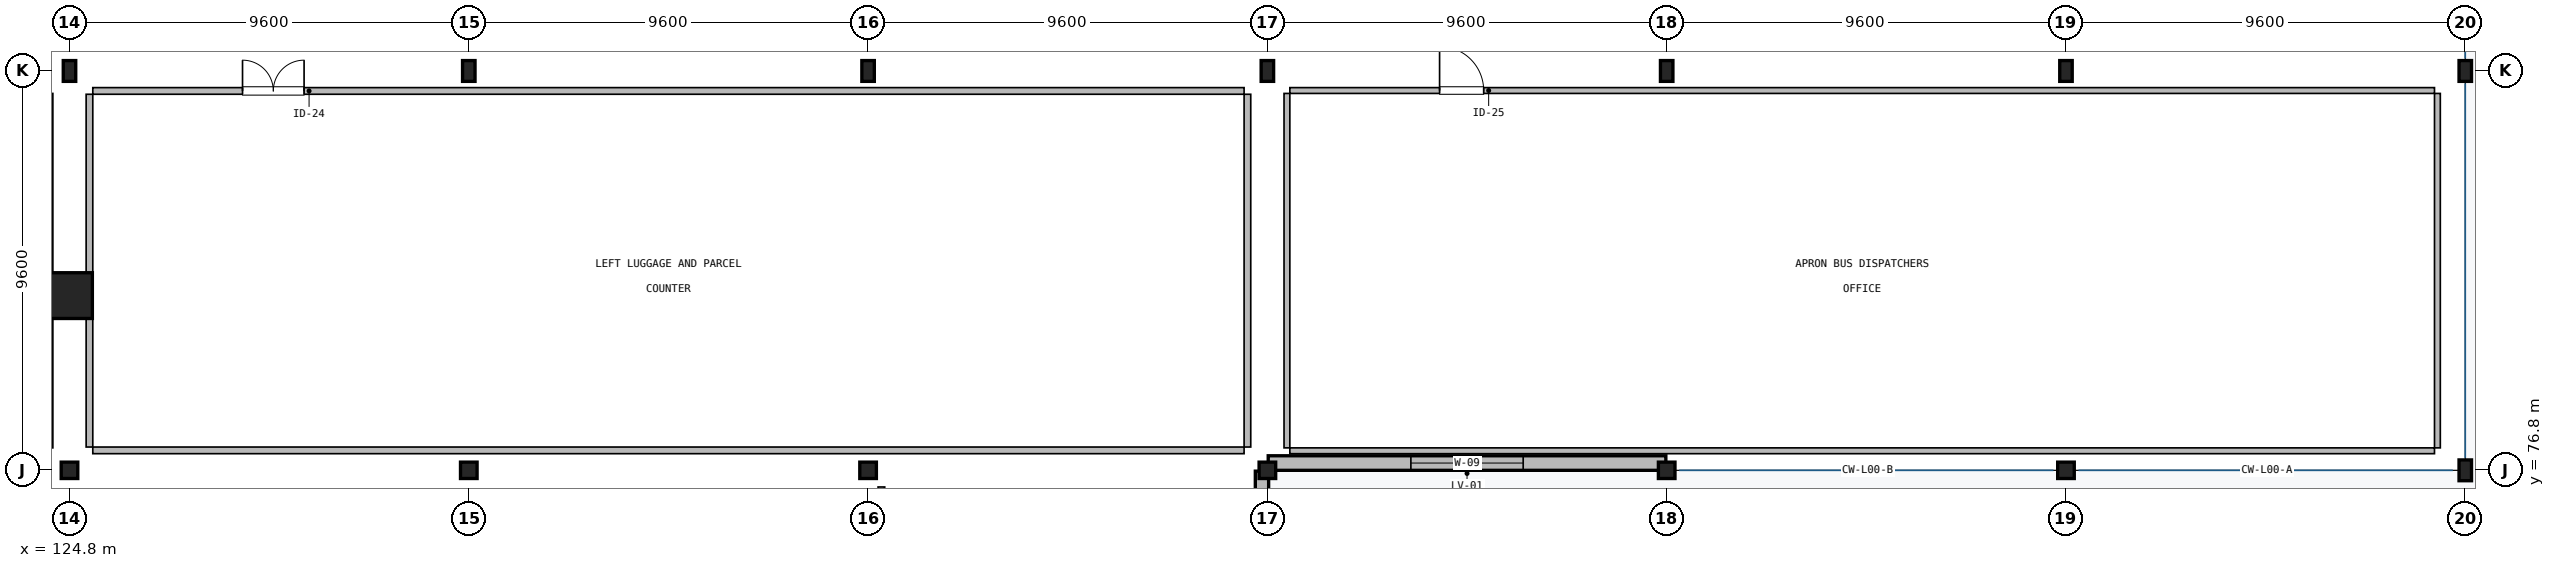
"""IFC4 building model, lengths in metres.
Left out: names, types, materials, properties, quantities, classifications, styles, units other than length and angle.
Written with IfcOpenShell. Run it as: python <this file> out.ifc"""

import sys

from ifc_helpers import new_model, si_unit, direction, frame, frame_2d, origin, origin_2d, place, context, subcontext, project, spatial, rectangle, i_section, extrude, element, fill, save


model = new_model("IFC4")
c1 = context("Model", 3, precision=1e-05, world=origin(), true_north=direction((0.0, 1.0)))
c2 = subcontext(c1, "Body", "Model", "MODEL_VIEW")
j1 = project(units=[si_unit("LENGTHUNIT", "METRE"), si_unit("PLANEANGLEUNIT", "RADIAN")], contexts=[c1])
p1 = place(None, origin())
s1 = spatial("IfcSite", under=j1, at=p1, CompositionType="ELEMENT")
p2 = place(p1, origin())
s2 = spatial("IfcBuilding", under=s1, at=p2, CompositionType="ELEMENT")
p3 = place(p2, origin())
s3 = spatial("IfcBuildingStorey", under=s2, at=p3, CompositionType="ELEMENT", Elevation=0.0)
p4 = place(p3, frame((124.8, 81.0, -0.02), z_axis=(0.0, 0.0, 1.0), x_axis=(1.0, 0.0, 0.0)))
e1 = element("IfcColumn", 1, at=p4, inside=s3, PredefinedType="COLUMN", context=c2, shape_type="SweptSolid", body=[
    extrude(rectangle(XDim=1.1, YDim=1.1, at=origin_2d()), origin(), (0.0, 0.0, 1.0), 1.84),
])
p5 = place(p3, frame((124.8, 76.8, 0.0), z_axis=(0.0, 0.0, 1.0), x_axis=(1.0, 0.0, 0.0)))
e2 = element("IfcColumn", 2, at=p5, inside=s3, PredefinedType="COLUMN", context=c2, shape_type="SweptSolid", body=[
    extrude(i_section(OverallWidth=0.399, OverallDepth=0.394, WebThickness=0.023, FlangeThickness=0.037, FilletRadius=0.015, at=origin_2d()), origin(), (0.0, 0.0, 1.0), 5.75),
])
p6 = place(p3, frame((124.8, 86.4, -0.36), z_axis=(0.0, 0.0, 1.0), x_axis=(1.0, 0.0, 0.0)))
e3 = element("IfcColumn", 3, at=p6, inside=s3, PredefinedType="COLUMN", context=c2, shape_type="SweptSolid", body=[
    extrude(i_section(OverallWidth=0.3, OverallDepth=0.5, WebThickness=0.014, FlangeThickness=0.028, FilletRadius=0.027, at=origin_2d()), origin(), (0.0, 0.0, 1.0), 6.11),
])
p7 = place(p3, frame((134.4, 76.8, 0.0), z_axis=(0.0, 0.0, 1.0), x_axis=(1.0, 0.0, 0.0)))
e4 = element("IfcColumn", 4, at=p7, inside=s3, PredefinedType="COLUMN", context=c2, shape_type="SweptSolid", body=[
    extrude(i_section(OverallWidth=0.399, OverallDepth=0.394, WebThickness=0.023, FlangeThickness=0.037, FilletRadius=0.015, at=origin_2d()), origin(), (0.0, 0.0, 1.0), 5.75),
])
p8 = place(p3, frame((134.4, 86.4, -0.36), z_axis=(0.0, 0.0, 1.0), x_axis=(1.0, 0.0, 0.0)))
e5 = element("IfcColumn", 5, at=p8, inside=s3, PredefinedType="COLUMN", context=c2, shape_type="SweptSolid", body=[
    extrude(i_section(OverallWidth=0.3, OverallDepth=0.5, WebThickness=0.014, FlangeThickness=0.028, FilletRadius=0.027, at=origin_2d()), origin(), (0.0, 0.0, 1.0), 6.11),
])
p9 = place(p3, frame((144.0, 76.8, 0.0), z_axis=(0.0, 0.0, 1.0), x_axis=(1.0, 0.0, 0.0)))
e6 = element("IfcColumn", 6, at=p9, inside=s3, PredefinedType="COLUMN", context=c2, shape_type="SweptSolid", body=[
    extrude(i_section(OverallWidth=0.399, OverallDepth=0.394, WebThickness=0.023, FlangeThickness=0.037, FilletRadius=0.015, at=origin_2d()), origin(), (0.0, 0.0, 1.0), 5.75),
])
p10 = place(p3, frame((144.0, 86.4, -0.36), z_axis=(0.0, 0.0, 1.0), x_axis=(1.0, 0.0, 0.0)))
e7 = element("IfcColumn", 7, at=p10, inside=s3, PredefinedType="COLUMN", context=c2, shape_type="SweptSolid", body=[
    extrude(i_section(OverallWidth=0.3, OverallDepth=0.5, WebThickness=0.014, FlangeThickness=0.028, FilletRadius=0.027, at=origin_2d()), origin(), (0.0, 0.0, 1.0), 6.11),
])
p11 = place(p3, frame((153.6, 76.8, 0.0), z_axis=(0.0, 0.0, 1.0), x_axis=(1.0, 0.0, 0.0)))
e8 = element("IfcColumn", 8, at=p11, inside=s3, PredefinedType="COLUMN", context=c2, shape_type="SweptSolid", body=[
    extrude(i_section(OverallWidth=0.399, OverallDepth=0.394, WebThickness=0.023, FlangeThickness=0.037, FilletRadius=0.015, at=origin_2d()), origin(), (0.0, 0.0, 1.0), 5.75),
])
p12 = place(p3, frame((153.6, 86.4, -0.36), z_axis=(0.0, 0.0, 1.0), x_axis=(1.0, 0.0, 0.0)))
e9 = element("IfcColumn", 9, at=p12, inside=s3, PredefinedType="COLUMN", context=c2, shape_type="SweptSolid", body=[
    extrude(i_section(OverallWidth=0.3, OverallDepth=0.5, WebThickness=0.014, FlangeThickness=0.028, FilletRadius=0.027, at=origin_2d()), origin(), (0.0, 0.0, 1.0), 6.11),
])
p13 = place(p3, frame((163.2, 76.8, -0.36), z_axis=(0.0, 0.0, 1.0), x_axis=(1.0, 0.0, 0.0)))
e10 = element("IfcColumn", 10, at=p13, inside=s3, PredefinedType="COLUMN", context=c2, shape_type="SweptSolid", body=[
    extrude(i_section(OverallWidth=0.399, OverallDepth=0.394, WebThickness=0.023, FlangeThickness=0.037, FilletRadius=0.015, at=origin_2d()), origin(), (0.0, 0.0, 1.0), 6.11),
])
p14 = place(p3, frame((163.2, 86.4, -0.36), z_axis=(0.0, 0.0, 1.0), x_axis=(1.0, 0.0, 0.0)))
e11 = element("IfcColumn", 11, at=p14, inside=s3, PredefinedType="COLUMN", context=c2, shape_type="SweptSolid", body=[
    extrude(i_section(OverallWidth=0.3, OverallDepth=0.5, WebThickness=0.014, FlangeThickness=0.028, FilletRadius=0.027, at=origin_2d()), origin(), (0.0, 0.0, 1.0), 6.11),
])
p15 = place(p3, frame((172.8, 76.8, -0.36), z_axis=(0.0, 0.0, 1.0), x_axis=(1.0, 0.0, 0.0)))
e12 = element("IfcColumn", 12, at=p15, inside=s3, PredefinedType="COLUMN", context=c2, shape_type="SweptSolid", body=[
    extrude(i_section(OverallWidth=0.399, OverallDepth=0.394, WebThickness=0.023, FlangeThickness=0.037, FilletRadius=0.015, at=origin_2d()), origin(), (0.0, 0.0, 1.0), 6.11),
])
for number, where, z_axis, x_axis in (
    (13, (172.8, 86.4, -0.36), (0.0, 0.0, 1.0), (1.0, 0.0, 0.0)),
    (14, (182.4, 76.8, -0.36), (0.0, 0.0, 1.0), (1.0, 0.0, 0.0)),
    (15, (182.4, 86.4, -0.36), (0.0, 0.0, 1.0), (1.0, 0.0, 0.0)),
):
    element("IfcColumn", number, at=place(p3, frame(where, z_axis=z_axis, x_axis=x_axis)), inside=s3, PredefinedType="COLUMN", context=c2, shape_type="SweptSolid", body=[
        extrude(i_section(OverallWidth=0.3, OverallDepth=0.5, WebThickness=0.014, FlangeThickness=0.028, FilletRadius=0.027, at=origin_2d()), origin(), (0.0, 0.0, 1.0), 6.11),
    ])
p16 = place(p3, frame((153.47, 76.78, 0.0), z_axis=(0.0, 0.0, 1.0), x_axis=(0.0, -1.0, 0.0)))
e16 = element("IfcWall", 16, at=p16, inside=s3, PredefinedType="SOLIDWALL", context=c2, shape_type="SweptSolid", body=[
    extrude(rectangle(XDim=9.56, YDim=0.32, at=frame_2d((4.78, 0.0))), origin(), (0.0, 0.0, 1.0), 5.217),
])
p17 = place(p16, frame((1.6, 0.0, 0.0)))
e17 = element("IfcOpeningElement", 17, at=p17, cuts=e16, PredefinedType="OPENING", context=c2, shape_type="SweptSolid", body=[
    extrude(rectangle(XDim=1.6, YDim=2.2, at=frame_2d((0.8, 1.1))), frame((0.0, 0.17, 0.0), z_axis=(0.0, -1.0, 0.0), x_axis=(1.0, 0.0, 0.0)), (0.0, 0.0, 1.0), 0.34),
])
p18 = place(p3, frame((163.18, 76.975, 0.0), z_axis=(0.0, 0.0, 1.0), x_axis=(-1.0, 0.0, 0.0)))
e18 = element("IfcWall", 18, at=p18, inside=s3, PredefinedType="SOLIDWALL", context=c2, shape_type="SweptSolid", body=[
    extrude(rectangle(XDim=9.56, YDim=0.35, at=frame_2d((4.78, 0.0))), origin(), (0.0, 0.0, 1.0), 5.4),
])
p19 = place(p18, frame((3.43, 0.0, 0.9)))
e19 = element("IfcOpeningElement", 19, at=p19, cuts=e18, PredefinedType="OPENING", context=c2, shape_type="SweptSolid", body=[
    extrude(rectangle(XDim=2.7, YDim=1.5, at=frame_2d((1.35, 0.75))), frame((0.0, 0.185, 0.0), z_axis=(0.0, -1.0, 0.0), x_axis=(1.0, 0.0, 0.0)), (0.0, 0.0, 1.0), 0.37),
])
p20 = place(p3, frame((144.32, 71.82, 0.0), z_axis=(0.0, 0.0, 1.0), x_axis=(0.0, 1.0, 0.0)))
e20 = element("IfcWall", 20, at=p20, inside=s3, PredefinedType="PARTITIONING", context=c2, shape_type="SweptSolid", body=[
    extrude(rectangle(XDim=4.58, YDim=0.16, at=frame_2d((2.29, 0.0))), origin(), (0.0, 0.0, 1.0), 5.39),
])
p21 = place(p20, frame((1.1, 0.0, 0.0)))
e21 = element("IfcOpeningElement", 21, at=p21, cuts=e20, PredefinedType="OPENING", context=c2, shape_type="SweptSolid", body=[
    extrude(rectangle(XDim=1.1, YDim=2.2, at=frame_2d((0.55, 1.1))), frame((0.0, 0.09, 0.0), z_axis=(0.0, -1.0, 0.0), x_axis=(1.0, 0.0, 0.0)), (0.0, 0.0, 1.0), 0.18),
])
p22 = place(p3, frame((124.33, 85.86, 0.0), z_axis=(0.0, 0.0, 1.0), x_axis=(0.0, -1.0, 0.0)))
e22 = element("IfcWall", 22, at=p22, inside=s3, PredefinedType="PARTITIONING", context=c2, shape_type="SweptSolid", body=[
    extrude(rectangle(XDim=8.52, YDim=0.14, at=frame_2d((4.26, 0.0))), origin(), (0.0, 0.0, 1.0), 5.39),
])
p23 = place(p3, frame((153.04, 77.28, 0.0), z_axis=(0.0, 0.0, 1.0), x_axis=(-1.0, 0.0, 0.0)))
e23 = element("IfcWall", 23, at=p23, inside=s3, PredefinedType="PARTITIONING", context=c2, shape_type="SweptSolid", body=[
    extrude(rectangle(XDim=27.68, YDim=0.16, at=frame_2d((13.84, 0.0))), origin(), (0.0, 0.0, 1.0), 5.207),
])
p24 = place(p3, frame((125.36, 85.92, 0.0), z_axis=(0.0, 0.0, 1.0), x_axis=(1.0, 0.0, 0.0)))
e24 = element("IfcWall", 24, at=p24, inside=s3, PredefinedType="PARTITIONING", context=c2, shape_type="SweptSolid", body=[
    extrude(rectangle(XDim=27.68, YDim=0.16, at=frame_2d((13.84, 0.0))), origin(), (0.0, 0.0, 1.0), 5.207),
])
p25 = place(p24, frame((3.6, 0.0, 0.0)))
e25 = element("IfcOpeningElement", 25, at=p25, cuts=e24, PredefinedType="OPENING", context=c2, shape_type="SweptSolid", body=[
    extrude(rectangle(XDim=1.48, YDim=2.25, at=frame_2d((0.74, 1.125))), frame((0.0, 0.09, 0.0), z_axis=(0.0, -1.0, 0.0), x_axis=(1.0, 0.0, 0.0)), (0.0, 0.0, 1.0), 0.18),
])
for number, where, z_axis, x_axis in (
    (26, (125.28, 77.36, 0.0), (0.0, 0.0, 1.0), (0.0, 1.0, 0.0)),
    (27, (153.12, 85.84, 0.0), (0.0, 0.0, 1.0), (0.0, -1.0, 0.0)),
):
    element("IfcWall", number, at=place(p3, frame(where, z_axis=z_axis, x_axis=x_axis)), inside=s3, PredefinedType="PARTITIONING", context=c2, shape_type="SweptSolid", body=[
        extrude(rectangle(XDim=8.48, YDim=0.16, at=frame_2d((4.24, 0.0))), origin(), (0.0, 0.0, 1.0), 5.39),
    ])
p26 = place(p3, frame((181.66, 77.27, 0.0), z_axis=(0.0, 0.0, 1.0), x_axis=(-1.0, 0.0, 0.0)))
e28 = element("IfcWall", 28, at=p26, inside=s3, PredefinedType="PARTITIONING", context=c2, shape_type="SweptSolid", body=[
    extrude(rectangle(XDim=27.52, YDim=0.14, at=frame_2d((13.76, 0.0))), origin(), (0.0, 0.0, 1.0), 5.207),
])
p27 = place(p3, frame((154.14, 85.93, 0.0), z_axis=(0.0, 0.0, 1.0), x_axis=(1.0, 0.0, 0.0)))
e29 = element("IfcWall", 29, at=p27, inside=s3, PredefinedType="PARTITIONING", context=c2, shape_type="SweptSolid", body=[
    extrude(rectangle(XDim=27.52, YDim=0.14, at=frame_2d((13.76, 0.0))), origin(), (0.0, 0.0, 1.0), 5.207),
])
p28 = place(p27, frame((3.6, 0.0, 0.0)))
e30 = element("IfcOpeningElement", 30, at=p28, cuts=e29, PredefinedType="OPENING", context=c2, shape_type="SweptSolid", body=[
    extrude(rectangle(XDim=1.06, YDim=2.2, at=frame_2d((0.53, 1.1))), frame((0.0, 0.08, 0.0), z_axis=(0.0, -1.0, 0.0), x_axis=(1.0, 0.0, 0.0)), (0.0, 0.0, 1.0), 0.16),
])
for number, where, z_axis, x_axis in (
    (31, (154.07, 77.34, 0.0), (0.0, 0.0, 1.0), (0.0, 1.0, 0.0)),
    (32, (181.73, 85.86, 0.0), (0.0, 0.0, 1.0), (0.0, -1.0, 0.0)),
):
    element("IfcWall", number, at=place(p3, frame(where, z_axis=z_axis, x_axis=x_axis)), inside=s3, PredefinedType="PARTITIONING", context=c2, shape_type="SweptSolid", body=[
        extrude(rectangle(XDim=8.52, YDim=0.14, at=frame_2d((4.26, 0.0))), origin(), (0.0, 0.0, 1.0), 5.39),
    ])
p29 = place(p19, origin())
e33 = element("IfcWindow", 33, at=p29, inside=s3, PartitioningType="SINGLE_PANEL", PredefinedType="WINDOW", context=c2, shape_type="SweptSolid", body=[
    extrude(rectangle(XDim=2.7, YDim=1.5, at=frame_2d((1.35, 0.75))), frame((0.0, 0.03, 0.0), z_axis=(0.0, -1.0, 0.0), x_axis=(1.0, 0.0, 0.0)), (0.0, 0.0, 1.0), 0.06),
])
fill(e19, e33)
p30 = place(p25, origin())
e34 = element("IfcDoor", 34, at=p30, inside=s3, OperationType="DOUBLE_DOOR_SINGLE_SWING", PredefinedType="DOOR", context=c2, shape_type="SweptSolid", body=[
    extrude(rectangle(XDim=1.48, YDim=2.25, at=frame_2d((0.74, 1.125))), frame((0.0, 0.025, 0.0), z_axis=(0.0, -1.0, 0.0), x_axis=(1.0, 0.0, 0.0)), (0.0, 0.0, 1.0), 0.05),
])
fill(e25, e34)
p31 = place(p28, origin())
e35 = element("IfcDoor", 35, at=p31, inside=s3, OperationType="SINGLE_SWING_LEFT", PredefinedType="DOOR", context=c2, shape_type="SweptSolid", body=[
    extrude(rectangle(XDim=1.06, YDim=2.2, at=frame_2d((0.53, 1.1))), frame((0.0, 0.025, 0.0), z_axis=(0.0, -1.0, 0.0), x_axis=(1.0, 0.0, 0.0)), (0.0, 0.0, 1.0), 0.05),
])
fill(e30, e35)
save(model, sys.argv[1])
